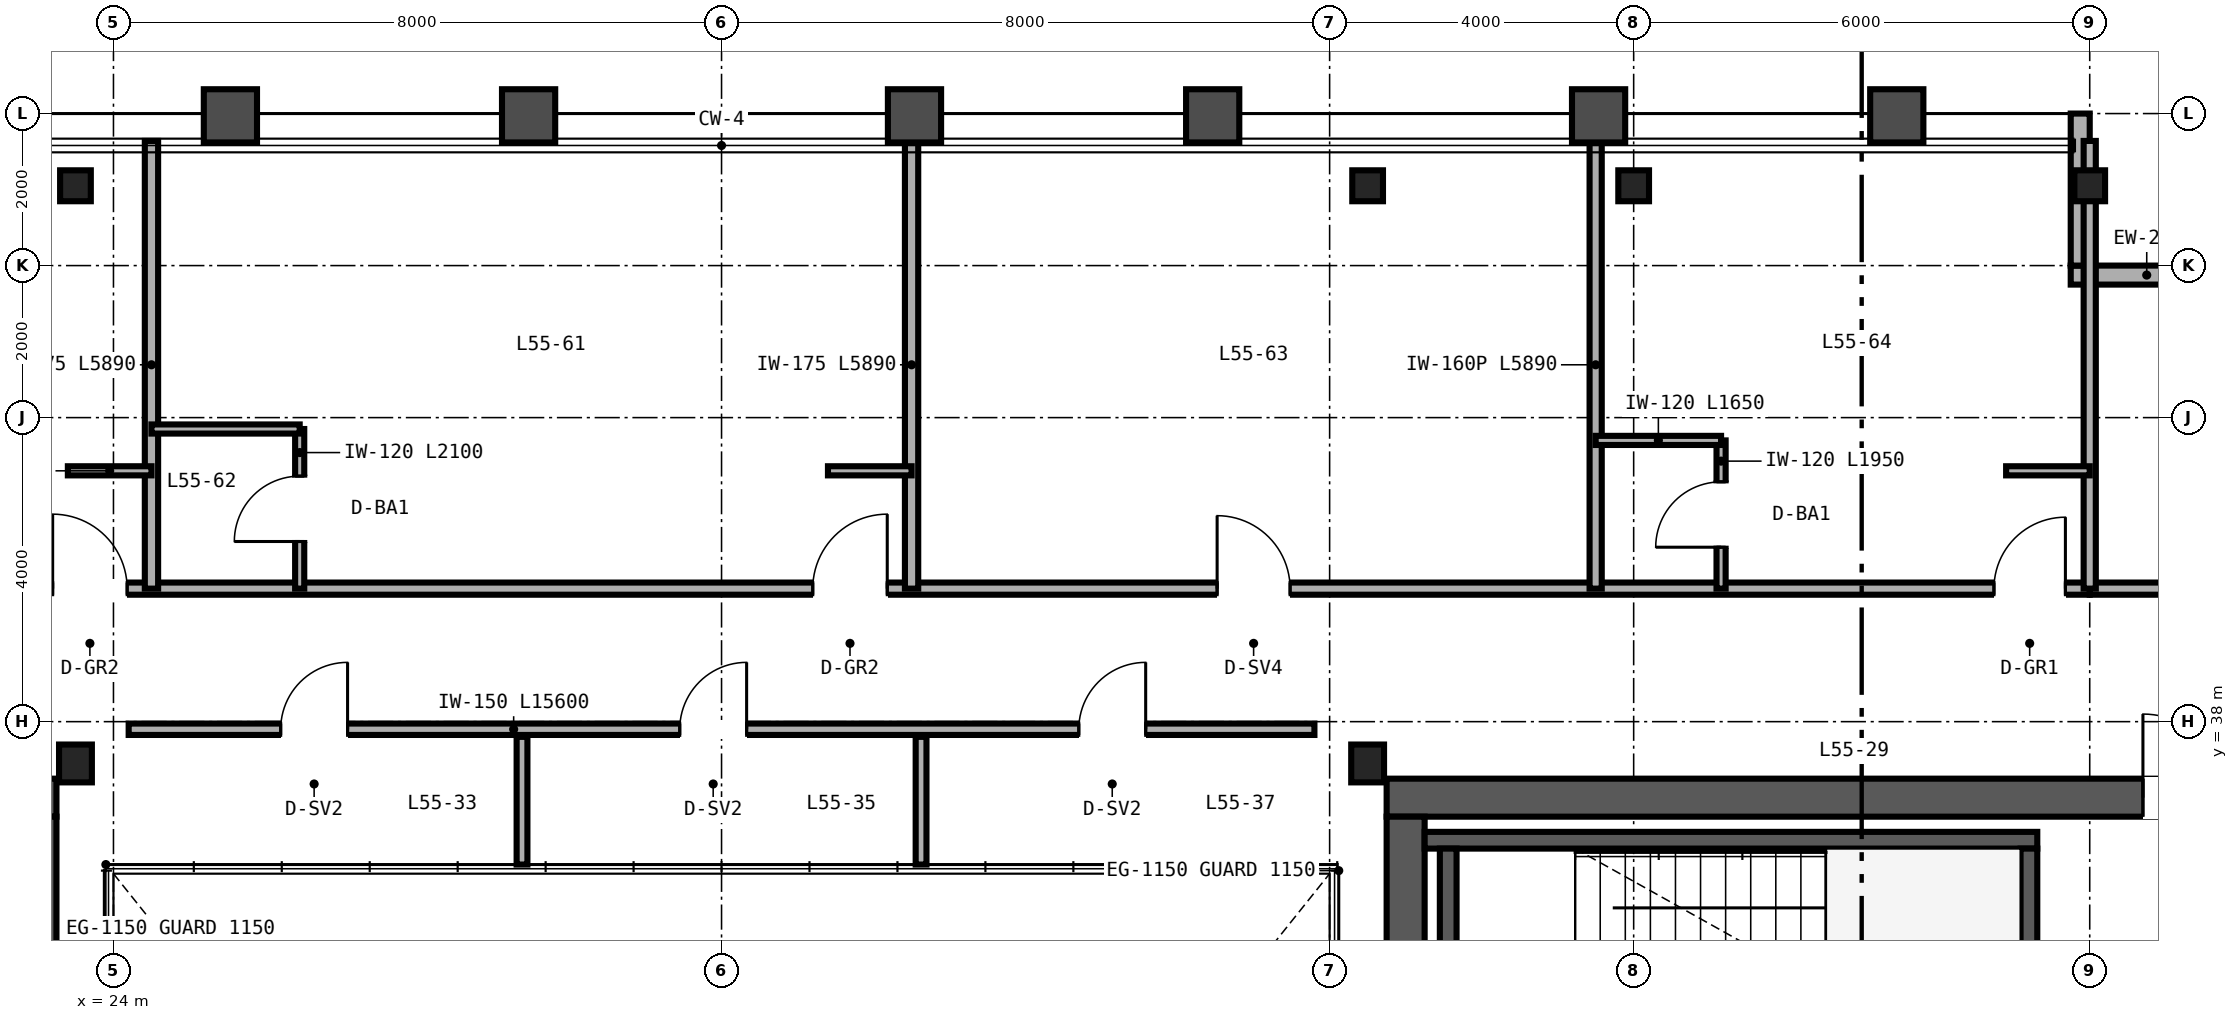
"""IFC4 building model, lengths in metres.
Left out: names, types, materials, properties, quantities, classifications, styles, units other than length and angle.
Written with IfcOpenShell. Run it as: python <this file> out.ifc"""

import sys

from ifc_helpers import new_model, si_unit, direction, frame, frame_2d, origin, origin_2d, place, context, subcontext, project, spatial, rectangle, i_section, extrude, source, transform, mapped, element, fill, save


model = new_model("IFC4")
c1 = context("Model", 3, precision=1e-05, world=origin(), true_north=direction((0.0, 1.0)))
c2 = subcontext(c1, "Body", "Model", "MODEL_VIEW")
j1 = project(units=[si_unit("LENGTHUNIT", "METRE"), si_unit("PLANEANGLEUNIT", "RADIAN")], contexts=[c1])
p1 = place(None, origin())
s1 = spatial("IfcSite", under=j1, at=p1, CompositionType="ELEMENT")
p2 = place(p1, origin())
s2 = spatial("IfcBuilding", under=s1, at=p2, CompositionType="ELEMENT")
p3 = place(p2, frame((0.0, 0.0, 217.2)))
s3 = spatial("IfcBuildingStorey", under=s2, at=p3, CompositionType="ELEMENT", Elevation=217.2)
p4 = place(p3, frame((10.75, 37.0, 0.0), z_axis=(0.0, 0.0, 1.0), x_axis=(1.0, 0.0, 0.0)))
e1 = element("IfcWall", 1, at=p4, inside=s3, PredefinedType="SHEAR", context=c2, shape_type="SweptSolid", body=[
    extrude(rectangle(XDim=12.5, YDim=0.5, at=frame_2d((6.25, 0.0))), origin(), (0.0, 0.0, 1.0), 3.28),
])
p5 = place(p4, frame((10.35, 0.0, 0.0)))
e2 = element("IfcOpeningElement", 2, at=p5, cuts=e1, PredefinedType="OPENING", context=c2, shape_type="SweptSolid", body=[
    extrude(rectangle(XDim=1.0, YDim=2.15, at=frame_2d((0.5, 1.075))), frame((0.0, 0.26, 0.0), z_axis=(0.0, -1.0, 0.0), x_axis=(1.0, 0.0, 0.0)), (0.0, 0.0, 1.0), 0.52),
])
p6 = place(p3, frame((23.0, 15.25, 0.0), z_axis=(0.0, 0.0, 1.0), x_axis=(0.0, 1.0, 0.0)))
e3 = element("IfcWall", 3, at=p6, inside=s3, PredefinedType="SHEAR", context=c2, shape_type="SweptSolid", body=[
    extrude(rectangle(XDim=21.5, YDim=0.5, at=frame_2d((10.75, 0.0))), origin(), (0.0, 0.0, 1.0), 3.28),
])
p7 = place(p3, frame((40.75, 37.0, 0.0), z_axis=(0.0, 0.0, 1.0), x_axis=(1.0, 0.0, 0.0)))
e4 = element("IfcWall", 4, at=p7, inside=s3, PredefinedType="SHEAR", context=c2, shape_type="SweptSolid", body=[
    extrude(rectangle(XDim=12.5, YDim=0.5, at=frame_2d((6.25, 0.0))), origin(), (0.0, 0.0, 1.0), 3.28),
])
p8 = place(p7, frame((9.95, 0.0, 0.0)))
e5 = element("IfcOpeningElement", 5, at=p8, cuts=e4, PredefinedType="OPENING", context=c2, shape_type="SweptSolid", body=[
    extrude(rectangle(XDim=1.1, YDim=2.15, at=frame_2d((0.55, 1.075))), frame((0.0, 0.26, 0.0), z_axis=(0.0, -1.0, 0.0), x_axis=(1.0, 0.0, 0.0)), (0.0, 0.0, 1.0), 0.52),
])
p9 = place(p3, frame((41.0, 15.25, 0.0), z_axis=(0.0, 0.0, 1.0), x_axis=(0.0, 1.0, 0.0)))
e6 = element("IfcWall", 6, at=p9, inside=s3, PredefinedType="SHEAR", context=c2, shape_type="SweptSolid", body=[
    extrude(rectangle(XDim=21.5, YDim=0.5, at=frame_2d((10.75, 0.0))), origin(), (0.0, 0.0, 1.0), 3.28),
])
p10 = place(p3, frame((41.25, 36.44, 0.0), z_axis=(0.0, 0.0, 1.0), x_axis=(1.0, 0.0, 0.0)))
e7 = element("IfcWall", 7, at=p10, inside=s3, PredefinedType="SHEAR", context=c2, shape_type="SweptSolid", body=[
    extrude(rectangle(XDim=8.06, YDim=0.22, at=frame_2d((4.03, 0.0))), origin(), (0.0, 0.0, 1.0), 3.4),
])
for number, where, z_axis, x_axis in (
    (8, (41.56, 33.05, 0.0), (0.0, 0.0, 1.0), (0.0, 1.0, 0.0)),
    (9, (49.2, 33.05, 0.0), (0.0, 0.0, 1.0), (0.0, 1.0, 0.0)),
):
    element("IfcWall", number, at=place(p3, frame(where, z_axis=z_axis, x_axis=x_axis)), inside=s3, PredefinedType="SHEAR", context=c2, shape_type="SweptSolid", body=[
        extrude(rectangle(XDim=3.28, YDim=0.22, at=frame_2d((1.64, 0.0))), origin(), (0.0, 0.0, 1.0), 3.4),
    ])
m1 = source(origin(), c2, "Body", "SweptSolid", [
    extrude(i_section(OverallWidth=0.432, OverallDepth=0.498, WebThickness=0.056, FlangeThickness=0.089, FilletRadius=0.025, at=origin_2d()), origin(), (0.0, 0.0, 1.0), 3.28),
])
for number, where, z_axis, x_axis in (
    (10, (23.5, 37.45, 0.0), (0.0, 0.0, 1.0), (1.0, 0.0, 0.0)),
    (11, (40.5, 37.45, 0.0), (0.0, 0.0, 1.0), (1.0, 0.0, 0.0)),
):
    element("IfcColumn", number, at=place(p3, frame(where, z_axis=z_axis, x_axis=x_axis)), inside=s3, PredefinedType="COLUMN", context=c2, shape_type="MappedRepresentation", body=[
        mapped(m1, transform((0.0, 0.0, 0.0), scale=1.0)),
    ])
m2 = source(origin(), c2, "Body", "SweptSolid", [
    extrude(i_section(OverallWidth=0.404, OverallDepth=0.407, WebThickness=0.027, FlangeThickness=0.044, FilletRadius=0.025, at=origin_2d()), origin(), (0.0, 0.0, 1.0), 3.28),
])
for number, where, z_axis, x_axis in (
    (12, (23.5, 45.05, 0.0), (0.0, 0.0, 1.0), (1.0, 0.0, 0.0)),
    (13, (40.5, 45.05, 0.0), (0.0, 0.0, 1.0), (1.0, 0.0, 0.0)),
    (14, (44.0, 45.05, 0.0), (0.0, 0.0, 1.0), (1.0, 0.0, 0.0)),
    (15, (50.0, 45.05, 0.0), (0.0, 0.0, 1.0), (1.0, 0.0, 0.0)),
):
    element("IfcColumn", number, at=place(p3, frame(where, z_axis=z_axis, x_axis=x_axis)), inside=s3, PredefinedType="COLUMN", context=c2, shape_type="MappedRepresentation", body=[
        mapped(m2, transform((0.0, 0.0, 0.0), scale=1.0)),
    ])
p11 = place(p3, frame((51.75, 43.875, 0.0), z_axis=(0.0, 0.0, 1.0), x_axis=(-1.0, 0.0, 0.0)))
e16 = element("IfcWall", 16, at=p11, inside=s3, PredefinedType="SOLIDWALL", context=c2, shape_type="SweptSolid", body=[
    extrude(rectangle(XDim=2.0, YDim=0.25, at=frame_2d((1.0, 0.0))), origin(), (0.0, 0.0, 1.0), 3.28),
])
p12 = place(p3, frame((49.875, 44.0, 0.0), z_axis=(0.0, 0.0, 1.0), x_axis=(0.0, 1.0, 0.0)))
e17 = element("IfcWall", 17, at=p12, inside=s3, PredefinedType="SOLIDWALL", context=c2, shape_type="SweptSolid", body=[
    extrude(rectangle(XDim=2.0, YDim=0.25, at=frame_2d((1.0, 0.0))), origin(), (0.0, 0.0, 1.0), 2.587),
])
p13 = place(p3, frame((24.2, 37.9, 0.0), z_axis=(0.0, 0.0, 1.0), x_axis=(1.0, 0.0, 0.0)))
e18 = element("IfcWall", 18, at=p13, inside=s3, PredefinedType="PARTITIONING", context=c2, shape_type="SweptSolid", body=[
    extrude(rectangle(XDim=15.6, YDim=0.15, at=frame_2d((7.8, 0.0))), origin(), (0.0, 0.0, 1.0), 3.28),
])
p14 = place(p13, frame((2.0, 0.0, 0.0)))
e19 = element("IfcOpeningElement", 19, at=p14, cuts=e18, PredefinedType="OPENING", context=c2, shape_type="SweptSolid", body=[
    extrude(rectangle(XDim=0.88, YDim=2.15, at=frame_2d((0.44, 1.075))), frame((0.0, 0.085, 0.0), z_axis=(0.0, -1.0, 0.0), x_axis=(1.0, 0.0, 0.0)), (0.0, 0.0, 1.0), 0.17),
])
p15 = place(p13, frame((7.25, 0.0, 0.0)))
e20 = element("IfcOpeningElement", 20, at=p15, cuts=e18, PredefinedType="OPENING", context=c2, shape_type="SweptSolid", body=[
    extrude(rectangle(XDim=0.88, YDim=2.15, at=frame_2d((0.44, 1.075))), frame((0.0, 0.085, 0.0), z_axis=(0.0, -1.0, 0.0), x_axis=(1.0, 0.0, 0.0)), (0.0, 0.0, 1.0), 0.17),
])
p16 = place(p13, frame((12.5, 0.0, 0.0)))
e21 = element("IfcOpeningElement", 21, at=p16, cuts=e18, PredefinedType="OPENING", context=c2, shape_type="SweptSolid", body=[
    extrude(rectangle(XDim=0.88, YDim=2.15, at=frame_2d((0.44, 1.075))), frame((0.0, 0.085, 0.0), z_axis=(0.0, -1.0, 0.0), x_axis=(1.0, 0.0, 0.0)), (0.0, 0.0, 1.0), 0.17),
])
for number, where, z_axis, x_axis in (
    (22, (29.375, 36.12, 0.0), (0.0, 0.0, 1.0), (0.0, 1.0, 0.0)),
    (23, (34.625, 36.12, 0.0), (0.0, 0.0, 1.0), (0.0, 1.0, 0.0)),
):
    element("IfcWall", number, at=place(p3, frame(where, z_axis=z_axis, x_axis=x_axis)), inside=s3, PredefinedType="PARTITIONING", context=c2, shape_type="SweptSolid", body=[
        extrude(rectangle(XDim=1.68, YDim=0.142, at=frame_2d((0.84, 0.0))), origin(), (0.0, 0.0, 1.0), 3.28),
    ])
p17 = place(p3, frame((50.0, 39.75, 0.0), z_axis=(0.0, 0.0, 1.0), x_axis=(1.0, 0.0, 0.0)))
e24 = element("IfcWall", 24, at=p17, inside=s3, PredefinedType="PARTITIONING", context=c2, shape_type="SweptSolid", body=[
    extrude(rectangle(XDim=4.0, YDim=0.16, at=frame_2d((2.0, 0.0))), origin(), (0.0, 0.0, 1.0), 3.28),
])
p18 = place(p17, frame((1.52, 0.0, 0.0)))
e25 = element("IfcOpeningElement", 25, at=p18, cuts=e24, PredefinedType="OPENING", context=c2, shape_type="SweptSolid", body=[
    extrude(rectangle(XDim=0.96, YDim=2.15, at=frame_2d((0.48, 1.075))), frame((0.0, 0.09, 0.0), z_axis=(0.0, -1.0, 0.0), x_axis=(1.0, 0.0, 0.0)), (0.0, 0.0, 1.0), 0.18),
])
p19 = place(p3, frame((14.0, 39.75, 0.0), z_axis=(0.0, 0.0, 1.0), x_axis=(1.0, 0.0, 0.0)))
e26 = element("IfcWall", 26, at=p19, inside=s3, PredefinedType="PARTITIONING", context=c2, shape_type="SweptSolid", body=[
    extrude(rectangle(XDim=36.0, YDim=0.16, at=frame_2d((18.0, 0.0))), origin(), (0.0, 0.0, 1.0), 2.823),
])
p20 = place(p19, frame((9.2, 0.0, 0.0)))
e27 = element("IfcOpeningElement", 27, at=p20, cuts=e26, PredefinedType="OPENING", context=c2, shape_type="SweptSolid", body=[
    extrude(rectangle(XDim=0.98, YDim=2.2, at=frame_2d((0.49, 1.1))), frame((0.0, 0.09, 0.0), z_axis=(0.0, -1.0, 0.0), x_axis=(1.0, 0.0, 0.0)), (0.0, 0.0, 1.0), 0.18),
])
p21 = place(p19, frame((19.2, 0.0, 0.0)))
e28 = element("IfcOpeningElement", 28, at=p21, cuts=e26, PredefinedType="OPENING", context=c2, shape_type="SweptSolid", body=[
    extrude(rectangle(XDim=0.98, YDim=2.2, at=frame_2d((0.49, 1.1))), frame((0.0, 0.09, 0.0), z_axis=(0.0, -1.0, 0.0), x_axis=(1.0, 0.0, 0.0)), (0.0, 0.0, 1.0), 0.18),
])
p22 = place(p19, frame((24.52, 0.0, 0.0)))
e29 = element("IfcOpeningElement", 29, at=p22, cuts=e26, PredefinedType="OPENING", context=c2, shape_type="SweptSolid", body=[
    extrude(rectangle(XDim=0.96, YDim=2.15, at=frame_2d((0.48, 1.075))), frame((0.0, 0.09, 0.0), z_axis=(0.0, -1.0, 0.0), x_axis=(1.0, 0.0, 0.0)), (0.0, 0.0, 1.0), 0.18),
])
p23 = place(p19, frame((34.74, 0.0, 0.0)))
e30 = element("IfcOpeningElement", 30, at=p23, cuts=e26, PredefinedType="OPENING", context=c2, shape_type="SweptSolid", body=[
    extrude(rectangle(XDim=0.94, YDim=2.15, at=frame_2d((0.47, 1.075))), frame((0.0, 0.09, 0.0), z_axis=(0.0, -1.0, 0.0), x_axis=(1.0, 0.0, 0.0)), (0.0, 0.0, 1.0), 0.18),
])
p24 = place(p3, frame((50.0, 39.75, 0.0), z_axis=(0.0, 0.0, 1.0), x_axis=(0.0, 1.0, 0.0)))
e31 = element("IfcWall", 31, at=p24, inside=s3, PredefinedType="PARTITIONING", context=c2, shape_type="SweptSolid", body=[
    extrude(rectangle(XDim=5.89, YDim=0.16, at=frame_2d((2.945, 0.0))), origin(), (0.0, 0.0, 1.0), 2.587),
])
p25 = place(p3, frame((24.5, 39.75, 0.0), z_axis=(0.0, 0.0, 1.0), x_axis=(0.0, 1.0, 0.0)))
e32 = element("IfcWall", 32, at=p25, inside=s3, PredefinedType="PARTITIONING", context=c2, shape_type="SweptSolid", body=[
    extrude(rectangle(XDim=5.89, YDim=0.175, at=frame_2d((2.945, 0.0))), origin(), (0.0, 0.0, 1.0), 2.36),
])
p26 = place(p3, frame((23.4, 41.3, 0.0), z_axis=(0.0, 0.0, 1.0), x_axis=(1.0, 0.0, 0.0)))
e33 = element("IfcWall", 33, at=p26, inside=s3, PredefinedType="PARTITIONING", context=c2, shape_type="SweptSolid", body=[
    extrude(rectangle(XDim=1.1, YDim=0.12, at=frame_2d((0.55, 0.0))), origin(), (0.0, 0.0, 1.0), 2.823),
])
p27 = place(p3, frame((34.5, 39.75, 0.0), z_axis=(0.0, 0.0, 1.0), x_axis=(0.0, 1.0, 0.0)))
e34 = element("IfcWall", 34, at=p27, inside=s3, PredefinedType="PARTITIONING", context=c2, shape_type="SweptSolid", body=[
    extrude(rectangle(XDim=5.89, YDim=0.175, at=frame_2d((2.945, 0.0))), origin(), (0.0, 0.0, 1.0), 2.36),
])
p28 = place(p3, frame((26.45, 39.75, 0.0), z_axis=(0.0, 0.0, 1.0), x_axis=(0.0, 1.0, 0.0)))
e35 = element("IfcWall", 35, at=p28, inside=s3, PredefinedType="PARTITIONING", context=c2, shape_type="SweptSolid", body=[
    extrude(rectangle(XDim=2.1, YDim=0.12, at=frame_2d((1.05, 0.0))), origin(), (0.0, 0.0, 1.0), 3.28),
])
p29 = place(p28, frame((0.62, 0.0, 0.0)))
e36 = element("IfcOpeningElement", 36, at=p29, cuts=e35, PredefinedType="OPENING", context=c2, shape_type="SweptSolid", body=[
    extrude(rectangle(XDim=0.86, YDim=2.1, at=frame_2d((0.43, 1.05))), frame((0.0, 0.07, 0.0), z_axis=(0.0, -1.0, 0.0), x_axis=(1.0, 0.0, 0.0)), (0.0, 0.0, 1.0), 0.14),
])
p30 = place(p3, frame((24.5, 41.85, 0.0), z_axis=(0.0, 0.0, 1.0), x_axis=(1.0, 0.0, 0.0)))
e37 = element("IfcWall", 37, at=p30, inside=s3, PredefinedType="PARTITIONING", context=c2, shape_type="SweptSolid", body=[
    extrude(rectangle(XDim=1.95, YDim=0.12, at=frame_2d((0.975, 0.0))), origin(), (0.0, 0.0, 1.0), 3.28),
])
p31 = place(p3, frame((33.4, 41.3, 0.0), z_axis=(0.0, 0.0, 1.0), x_axis=(1.0, 0.0, 0.0)))
e38 = element("IfcWall", 38, at=p31, inside=s3, PredefinedType="PARTITIONING", context=c2, shape_type="SweptSolid", body=[
    extrude(rectangle(XDim=1.1, YDim=0.12, at=frame_2d((0.55, 0.0))), origin(), (0.0, 0.0, 1.0), 3.28),
])
p32 = place(p3, frame((43.5, 39.75, 0.0), z_axis=(0.0, 0.0, 1.0), x_axis=(0.0, 1.0, 0.0)))
e39 = element("IfcWall", 39, at=p32, inside=s3, PredefinedType="PARTITIONING", context=c2, shape_type="SweptSolid", body=[
    extrude(rectangle(XDim=5.89, YDim=0.16, at=frame_2d((2.945, 0.0))), origin(), (0.0, 0.0, 1.0), 2.743),
])
p33 = place(p3, frame((45.15, 39.75, 0.0), z_axis=(0.0, 0.0, 1.0), x_axis=(0.0, 1.0, 0.0)))
e40 = element("IfcWall", 40, at=p33, inside=s3, PredefinedType="PARTITIONING", context=c2, shape_type="SweptSolid", body=[
    extrude(rectangle(XDim=1.95, YDim=0.12, at=frame_2d((0.975, 0.0))), origin(), (0.0, 0.0, 1.0), 3.28),
])
p34 = place(p33, frame((0.545, 0.0, 0.0)))
e41 = element("IfcOpeningElement", 41, at=p34, cuts=e40, PredefinedType="OPENING", context=c2, shape_type="SweptSolid", body=[
    extrude(rectangle(XDim=0.86, YDim=2.1, at=frame_2d((0.43, 1.05))), frame((0.0, 0.07, 0.0), z_axis=(0.0, -1.0, 0.0), x_axis=(1.0, 0.0, 0.0)), (0.0, 0.0, 1.0), 0.14),
])
p35 = place(p3, frame((43.5, 41.7, 0.0), z_axis=(0.0, 0.0, 1.0), x_axis=(1.0, 0.0, 0.0)))
e42 = element("IfcWall", 42, at=p35, inside=s3, PredefinedType="PARTITIONING", context=c2, shape_type="SweptSolid", body=[
    extrude(rectangle(XDim=1.65, YDim=0.12, at=frame_2d((0.825, 0.0))), origin(), (0.0, 0.0, 1.0), 3.28),
])
p36 = place(p3, frame((48.9, 41.3, 0.0), z_axis=(0.0, 0.0, 1.0), x_axis=(1.0, 0.0, 0.0)))
e43 = element("IfcWall", 43, at=p36, inside=s3, PredefinedType="PARTITIONING", context=c2, shape_type="SweptSolid", body=[
    extrude(rectangle(XDim=1.1, YDim=0.12, at=frame_2d((0.55, 0.0))), origin(), (0.0, 0.0, 1.0), 3.28),
])
m3 = source(origin(), c2, "Body", "SweptSolid", [
    extrude(rectangle(XDim=1.1, YDim=2.15, at=frame_2d((0.55, 1.075))), frame((0.0, 0.025, 0.0), z_axis=(0.0, -1.0, 0.0), x_axis=(1.0, 0.0, 0.0)), (0.0, 0.0, 1.0), 0.05),
])
p37 = place(p8, origin())
e44 = element("IfcDoor", 44, at=p37, inside=s3, OperationType="SINGLE_SWING_LEFT", PredefinedType="DOOR", context=c2, shape_type="MappedRepresentation", body=[
    mapped(m3, transform((0.0, 0.0, 0.0), scale=1.0)),
])
fill(e5, e44)
m4 = source(origin(), c2, "Body", "SweptSolid", [
    extrude(rectangle(XDim=0.88, YDim=2.15, at=frame_2d((0.44, 1.075))), frame((0.0, 0.025, 0.0), z_axis=(0.0, -1.0, 0.0), x_axis=(1.0, 0.0, 0.0)), (0.0, 0.0, 1.0), 0.05),
])
p38 = place(p14, origin())
e45 = element("IfcDoor", 45, at=p38, inside=s3, OperationType="SINGLE_SWING_RIGHT", PredefinedType="DOOR", context=c2, shape_type="MappedRepresentation", body=[
    mapped(m4, transform((0.0, 0.0, 0.0), scale=1.0)),
])
fill(e19, e45)
p39 = place(p15, origin())
e46 = element("IfcDoor", 46, at=p39, inside=s3, OperationType="SINGLE_SWING_RIGHT", PredefinedType="DOOR", context=c2, shape_type="MappedRepresentation", body=[
    mapped(m4, transform((0.0, 0.0, 0.0), scale=1.0)),
])
fill(e20, e46)
p40 = place(p16, origin())
e47 = element("IfcDoor", 47, at=p40, inside=s3, OperationType="SINGLE_SWING_RIGHT", PredefinedType="DOOR", context=c2, shape_type="MappedRepresentation", body=[
    mapped(m4, transform((0.0, 0.0, 0.0), scale=1.0)),
])
fill(e21, e47)
m5 = source(origin(), c2, "Body", "SweptSolid", [
    extrude(rectangle(XDim=0.86, YDim=2.1, at=frame_2d((0.43, 1.05))), frame((0.0, 0.025, 0.0), z_axis=(0.0, -1.0, 0.0), x_axis=(1.0, 0.0, 0.0)), (0.0, 0.0, 1.0), 0.05),
])
p41 = place(p29, origin())
e48 = element("IfcDoor", 48, at=p41, inside=s3, OperationType="SINGLE_SWING_LEFT", PredefinedType="DOOR", context=c2, shape_type="MappedRepresentation", body=[
    mapped(m5, transform((0.0, 0.0, 0.0), scale=1.0)),
])
fill(e36, e48)
p42 = place(p34, origin())
e49 = element("IfcDoor", 49, at=p42, inside=s3, OperationType="SINGLE_SWING_LEFT", PredefinedType="DOOR", context=c2, shape_type="MappedRepresentation", body=[
    mapped(m5, transform((0.0, 0.0, 0.0), scale=1.0)),
])
fill(e41, e49)
m6 = source(origin(), c2, "Body", "SweptSolid", [
    extrude(rectangle(XDim=0.98, YDim=2.2, at=frame_2d((0.49, 1.1))), frame((0.0, 0.025, 0.0), z_axis=(0.0, -1.0, 0.0), x_axis=(1.0, 0.0, 0.0)), (0.0, 0.0, 1.0), 0.05),
])
p43 = place(p20, origin())
e50 = element("IfcDoor", 50, at=p43, inside=s3, OperationType="SINGLE_SWING_LEFT", PredefinedType="DOOR", context=c2, shape_type="MappedRepresentation", body=[
    mapped(m6, transform((0.0, 0.0, 0.0), scale=1.0)),
])
fill(e27, e50)
p44 = place(p21, origin())
e51 = element("IfcDoor", 51, at=p44, inside=s3, OperationType="SINGLE_SWING_RIGHT", PredefinedType="DOOR", context=c2, shape_type="MappedRepresentation", body=[
    mapped(m6, transform((0.0, 0.0, 0.0), scale=1.0)),
])
fill(e28, e51)
m7 = source(origin(), c2, "Body", "SweptSolid", [
    extrude(rectangle(XDim=0.96, YDim=2.15, at=frame_2d((0.48, 1.075))), frame((0.0, 0.025, 0.0), z_axis=(0.0, -1.0, 0.0), x_axis=(1.0, 0.0, 0.0)), (0.0, 0.0, 1.0), 0.05),
])
p45 = place(p22, origin())
e52 = element("IfcDoor", 52, at=p45, inside=s3, OperationType="SINGLE_SWING_LEFT", PredefinedType="DOOR", context=c2, shape_type="MappedRepresentation", body=[
    mapped(m7, transform((0.0, 0.0, 0.0), scale=1.0)),
])
fill(e29, e52)
m8 = source(origin(), c2, "Body", "SweptSolid", [
    extrude(rectangle(XDim=0.94, YDim=2.15, at=frame_2d((0.47, 1.075))), frame((0.0, 0.025, 0.0), z_axis=(0.0, -1.0, 0.0), x_axis=(1.0, 0.0, 0.0)), (0.0, 0.0, 1.0), 0.05),
])
p46 = place(p23, origin())
e53 = element("IfcDoor", 53, at=p46, inside=s3, OperationType="SINGLE_SWING_RIGHT", PredefinedType="DOOR", context=c2, shape_type="MappedRepresentation", body=[
    mapped(m8, transform((0.0, 0.0, 0.0), scale=1.0)),
])
fill(e30, e53)
save(model, sys.argv[1])
